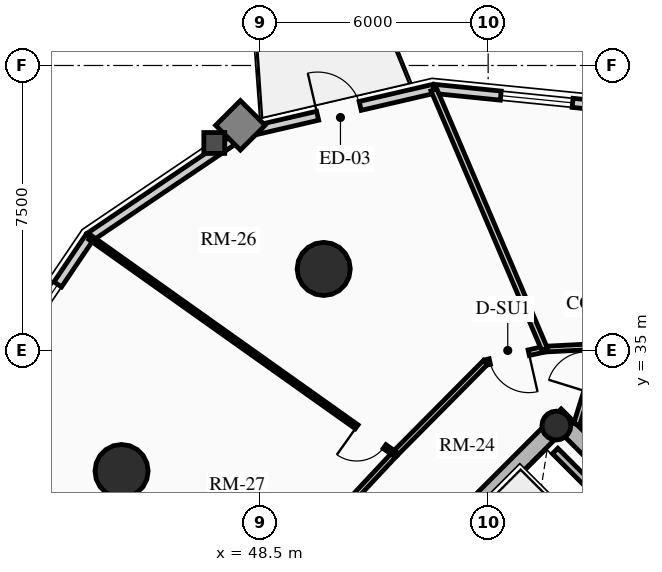
"""IFC4 building model, lengths in metres.
Left out: names, types, materials, properties, quantities, classifications, styles, units other than length and angle.
Written with IfcOpenShell. Run it as: python <this file> out.ifc"""

import sys

from ifc_helpers import new_model, si_unit, direction, frame, frame_2d, origin, origin_2d, place, context, subcontext, project, spatial, rectangle, circle, hollow_circle, extrude, source, transform, mapped, element, fill, save


model = new_model("IFC4")
c1 = context("Model", 3, precision=1e-05, world=origin(), true_north=direction((0.0, 1.0)))
c2 = subcontext(c1, "Body", "Model", "MODEL_VIEW")
j1 = project(units=[si_unit("LENGTHUNIT", "METRE"), si_unit("PLANEANGLEUNIT", "RADIAN")], contexts=[c1])
p1 = place(None, origin())
s1 = spatial("IfcSite", under=j1, at=p1, CompositionType="ELEMENT")
p2 = place(p1, origin())
s2 = spatial("IfcBuilding", under=s1, at=p2, CompositionType="ELEMENT")
p3 = place(p2, frame((0.0, 0.0, 119.62)))
s3 = spatial("IfcBuildingStorey", under=s2, at=p3, CompositionType="ELEMENT", Elevation=119.62)
p4 = place(p3, frame((66.303, 23.263, 0.0), z_axis=(0.0, 0.0, 1.0), x_axis=(-0.707106781187, 0.707106781187, 0.0)))
e1 = element("IfcWall", 1, at=p4, inside=s3, PredefinedType="SHEAR", context=c2, shape_type="SweptSolid", body=[
    extrude(rectangle(XDim=14.2, YDim=0.45, at=frame_2d((7.1, 0.0))), origin(), (0.0, 0.0, 1.0), 2.91),
])
p5 = place(p3, frame((48.856, 25.578, 0.0), z_axis=(0.0, 0.0, 1.0), x_axis=(0.707106781187, 0.707106781187, 0.0)))
e2 = element("IfcWall", 2, at=p5, inside=s3, PredefinedType="SHEAR", context=c2, shape_type="SweptSolid", body=[
    extrude(rectangle(XDim=10.7, YDim=0.45, at=frame_2d((5.35, 0.0))), origin(), (0.0, 0.0, 1.0), 2.91),
])
m1 = source(origin(), c2, "Body", "SweptSolid", [
    extrude(rectangle(XDim=1.5, YDim=2.02, at=frame_2d((0.75, 1.01))), frame((0.0, 0.235, 0.0), z_axis=(0.0, -1.0, 0.0), x_axis=(1.0, 0.0, 0.0)), (0.0, 0.0, 1.0), 0.47),
])
p6 = place(p5, frame((4.6, 0.0, 0.0)))
e3 = element("IfcOpeningElement", 3, at=p6, cuts=e2, PredefinedType="OPENING", context=c2, shape_type="MappedRepresentation", body=[
    mapped(m1, transform((0.0, 0.0, 0.0), x_axis=(1.0, 0.0, 0.0), y_axis=(0.0, 1.0, 0.0), z_axis=(0.0, 0.0, 1.0), scale=1.0)),
])
p7 = place(p3, frame((56.294, 33.024, 0.0), z_axis=(0.0, 0.0, 1.0), x_axis=(0.707106781187, 0.707106781187, 0.0)))
e4 = element("IfcColumn", 4, at=p7, inside=s3, PredefinedType="COLUMN", context=c2, shape_type="SweptSolid", body=[
    extrude(hollow_circle(Radius=0.38, WallThickness=0.032, at=origin_2d()), origin(), (0.0, 0.0, 1.0), 2.91),
])
for number, where, z_axis, x_axis in (
    (5, (50.173, 37.146, 0.0), (0.0, 0.0, 1.0), (1.0, 0.0, 0.0)),
    (6, (44.854, 31.827, 0.0), (0.0, 0.0, 1.0), (1.0, 0.0, 0.0)),
):
    element("IfcColumn", number, at=place(p3, frame(where, z_axis=z_axis, x_axis=x_axis)), inside=s3, PredefinedType="USERDEFINED", context=c2, shape_type="SweptSolid", body=[
        extrude(circle(Radius=0.7, at=origin_2d()), origin(), (0.0, 0.0, 1.0), 2.91),
    ])
p8 = place(p3, frame((53.067, 41.885, 0.0), z_axis=(0.0, 0.0, 1.0), x_axis=(0.994971754311, -0.10015591906, 0.0)))
e7 = element("IfcWall", 7, at=p8, inside=s3, PredefinedType="SOLIDWALL", context=c2, shape_type="SweptSolid", body=[
    extrude(rectangle(XDim=5.448, YDim=0.24, at=frame_2d((2.724, 0.0))), origin(), (0.0, 0.0, 1.0), 2.179),
])
m2 = source(origin(), c2, "Body", "SweptSolid", [
    extrude(rectangle(XDim=1.9, YDim=1.35, at=frame_2d((0.95, 0.675))), frame((0.0, 0.13, 0.0), z_axis=(0.0, -1.0, 0.0), x_axis=(1.0, 0.0, 0.0)), (0.0, 0.0, 1.0), 0.26),
])
p9 = place(p8, frame((1.774, 0.0, 0.65)))
e8 = element("IfcOpeningElement", 8, at=p9, cuts=e7, PredefinedType="OPENING", context=c2, shape_type="MappedRepresentation", body=[
    mapped(m2, transform((0.0, 0.0, 0.0), x_axis=(1.0, 0.0, 0.0), y_axis=(0.0, 1.0, 0.0), z_axis=(0.0, 0.0, 1.0), scale=1.0)),
])
p10 = place(p3, frame((48.08, 40.729, 0.0), z_axis=(0.0, 0.0, 1.0), x_axis=(0.974165631126, 0.225834725257, 0.0)))
e9 = element("IfcWall", 9, at=p10, inside=s3, PredefinedType="SOLIDWALL", context=c2, shape_type="SweptSolid", body=[
    extrude(rectangle(XDim=5.119, YDim=0.24, at=frame_2d((2.56, 0.0))), origin(), (0.0, 0.0, 1.0), 2.179),
])
m3 = source(origin(), c2, "Body", "SweptSolid", [
    extrude(rectangle(XDim=1.15, YDim=2.005, at=frame_2d((0.575, 1.002))), frame((0.0, 0.13, 0.0), z_axis=(0.0, -1.0, 0.0), x_axis=(1.0, 0.0, 0.0)), (0.0, 0.0, 1.0), 0.26),
])
p11 = place(p10, frame((1.984, 0.0, 0.0)))
e10 = element("IfcOpeningElement", 10, at=p11, cuts=e9, PredefinedType="OPENING", context=c2, shape_type="MappedRepresentation", body=[
    mapped(m3, transform((0.0, 0.0, 0.0), x_axis=(1.0, 0.0, 0.0), y_axis=(0.0, 1.0, 0.0), z_axis=(0.0, 0.0, 1.0), scale=1.0)),
])
p12 = place(p3, frame((44.015, 37.985, 0.0), z_axis=(0.0, 0.0, 1.0), x_axis=(0.828781148131, 0.559572880421, 0.0)))
e11 = element("IfcWall", 11, at=p12, inside=s3, PredefinedType="SOLIDWALL", context=c2, shape_type="SweptSolid", body=[
    extrude(rectangle(XDim=4.905, YDim=0.24, at=frame_2d((2.452, 0.0))), origin(), (0.0, 0.0, 1.0), 2.179),
])
p13 = place(p3, frame((41.271, 33.92, 0.0), z_axis=(0.0, 0.0, 1.0), x_axis=(0.559572880421, 0.828781148131, 0.0)))
e12 = element("IfcWall", 12, at=p13, inside=s3, PredefinedType="SOLIDWALL", context=c2, shape_type="SweptSolid", body=[
    extrude(rectangle(XDim=4.905, YDim=0.24, at=frame_2d((2.452, 0.0))), origin(), (0.0, 0.0, 1.0), 2.179),
])
p14 = place(p13, frame((1.502, 0.0, 0.65)))
e13 = element("IfcOpeningElement", 13, at=p14, cuts=e12, PredefinedType="OPENING", context=c2, shape_type="MappedRepresentation", body=[
    mapped(m2, transform((0.0, 0.0, 0.0), x_axis=(1.0, 0.0, 0.0), y_axis=(0.0, 1.0, 0.0), z_axis=(0.0, 0.0, 1.0), scale=1.0)),
])
p15 = place(p3, frame((55.615, 29.227, 0.0), z_axis=(0.0, 0.0, 1.0), x_axis=(0.707147878904, 0.70706568108, 0.0)))
e14 = element("IfcWall", 14, at=p15, inside=s3, PredefinedType="SHEAR", context=c2, shape_type="SweptSolid", body=[
    extrude(rectangle(XDim=2.97, YDim=0.2, at=frame_2d((1.485, 0.0))), origin(), (0.0, 0.0, 1.0), 2.91),
])
p16 = place(p3, frame((57.419, 31.2, 0.0), z_axis=(0.0, 0.0, 1.0), x_axis=(-0.707032117043, 0.707181437447, 0.0)))
e15 = element("IfcWall", 15, at=p16, inside=s3, PredefinedType="SHEAR", context=c2, shape_type="SweptSolid", body=[
    extrude(rectangle(XDim=1.635, YDim=0.2, at=frame_2d((0.817, 0.0))), origin(), (0.0, 0.0, 1.0), 2.91),
])
p17 = place(p3, frame((57.467, 35.111, 0.0), z_axis=(0.0, 0.0, 1.0), x_axis=(-0.998691757323, -0.051134859488, 0.0)))
e16 = element("IfcWall", 16, at=p17, inside=s3, PredefinedType="PARTITIONING", context=c2, shape_type="SweptSolid", body=[
    extrude(rectangle(XDim=1.485, YDim=0.15, at=frame_2d((0.742, 0.0))), origin(), (0.0, 0.0, 1.0), 2.225),
])
p18 = place(p3, frame((55.984, 35.035, 0.0), z_axis=(0.0, 0.0, 1.0), x_axis=(-0.975290305708, -0.22092718165, 0.0)))
e17 = element("IfcWall", 17, at=p18, inside=s3, PredefinedType="PARTITIONING", context=c2, shape_type="SweptSolid", body=[
    extrude(rectangle(XDim=1.597, YDim=0.15, at=frame_2d((0.798, 0.0))), origin(), (0.0, 0.0, 1.0), 2.225),
])
m4 = source(origin(), c2, "Body", "SweptSolid", [
    extrude(rectangle(XDim=1.05, YDim=2.015, at=frame_2d((0.525, 1.007))), frame((0.0, 0.085, 0.0), z_axis=(0.0, -1.0, 0.0), x_axis=(1.0, 0.0, 0.0)), (0.0, 0.0, 1.0), 0.17),
])
p19 = place(p18, frame((0.427, 0.0, 0.0)))
e18 = element("IfcOpeningElement", 18, at=p19, cuts=e17, PredefinedType="OPENING", context=c2, shape_type="MappedRepresentation", body=[
    mapped(m4, transform((0.0, 0.0, 0.0), x_axis=(1.0, 0.0, 0.0), y_axis=(0.0, 1.0, 0.0), z_axis=(0.0, 0.0, 1.0), scale=1.0)),
])
p20 = place(p3, frame((54.427, 34.683, 0.0), z_axis=(0.0, 0.0, 1.0), x_axis=(-0.704178989986, -0.710022499687, 0.0)))
e19 = element("IfcWall", 19, at=p20, inside=s3, PredefinedType="PARTITIONING", context=c2, shape_type="SweptSolid", body=[
    extrude(rectangle(XDim=3.384, YDim=0.15, at=frame_2d((1.692, 0.0))), origin(), (0.0, 0.0, 1.0), 2.225),
])
p21 = place(p3, frame((52.043, 32.28, 0.0), z_axis=(0.0, 0.0, 1.0), x_axis=(-0.682606081633, -0.730786519661, 0.0)))
e20 = element("IfcWall", 20, at=p21, inside=s3, PredefinedType="PARTITIONING", context=c2, shape_type="SweptSolid", body=[
    extrude(rectangle(XDim=6.527, YDim=0.15, at=frame_2d((3.263, 0.0))), origin(), (0.0, 0.0, 1.0), 2.225),
])
p22 = place(p3, frame((55.984, 35.035, 0.0), z_axis=(0.0, 0.0, 1.0), x_axis=(-0.392438685048, 0.919778168081, 0.0)))
e21 = element("IfcWall", 21, at=p22, inside=s3, PredefinedType="PARTITIONING", context=c2, shape_type="SweptSolid", body=[
    extrude(rectangle(XDim=7.426, YDim=0.16, at=frame_2d((3.713, 0.0))), origin(), (0.0, 0.0, 1.0), 2.179),
])
p23 = place(p3, frame((56.828, 33.056, 0.0), z_axis=(0.0, 0.0, 1.0), x_axis=(0.296730996083, 0.954961107042, 0.0)))
e22 = element("IfcWall", 22, at=p23, inside=s3, PredefinedType="PARTITIONING", context=c2, shape_type="SweptSolid", body=[
    extrude(rectangle(XDim=2.152, YDim=0.16, at=frame_2d((1.076, 0.0))), origin(), (0.0, 0.0, 1.0), 2.225),
])
m5 = source(origin(), c2, "Body", "SweptSolid", [
    extrude(rectangle(XDim=1.05, YDim=2.015, at=frame_2d((0.525, 1.007))), frame((0.0, 0.09, 0.0), z_axis=(0.0, -1.0, 0.0), x_axis=(1.0, 0.0, 0.0)), (0.0, 0.0, 1.0), 0.18),
])
p24 = place(p23, frame((0.902, 0.0, 0.0)))
e23 = element("IfcOpeningElement", 23, at=p24, cuts=e22, PredefinedType="OPENING", context=c2, shape_type="MappedRepresentation", body=[
    mapped(m5, transform((0.0, 0.0, 0.0), x_axis=(1.0, 0.0, 0.0), y_axis=(0.0, 1.0, 0.0), z_axis=(0.0, 0.0, 1.0), scale=1.0)),
])
p25 = place(p3, frame((52.043, 32.28, 0.0), z_axis=(0.0, 0.0, 1.0), x_axis=(-0.81534487613, 0.578975589268, 0.0)))
e24 = element("IfcWall", 24, at=p25, inside=s3, PredefinedType="PARTITIONING", context=c2, shape_type="SweptSolid", body=[
    extrude(rectangle(XDim=9.829, YDim=0.125, at=frame_2d((4.915, 0.0))), origin(), (0.0, 0.0, 1.0), 2.179),
])
m6 = source(origin(), c2, "Body", "SweptSolid", [
    extrude(rectangle(XDim=0.9, YDim=2.005, at=frame_2d((0.45, 1.002))), frame((0.0, 0.073, 0.0), z_axis=(0.0, -1.0, 0.0), x_axis=(1.0, 0.0, 0.0)), (0.0, 0.0, 1.0), 0.145),
])
p26 = place(p25, frame((0.33, 0.0, 0.0)))
e25 = element("IfcOpeningElement", 25, at=p26, cuts=e24, PredefinedType="OPENING", context=c2, shape_type="MappedRepresentation", body=[
    mapped(m6, transform((0.0, 0.0, 0.0), x_axis=(1.0, 0.0, 0.0), y_axis=(0.0, 1.0, 0.0), z_axis=(0.0, 0.0, 1.0), scale=1.0)),
])
m7 = source(origin(), c2, "Body", "SweptSolid", [
    extrude(rectangle(XDim=1.9, YDim=1.35, at=frame_2d((0.95, 0.675))), frame((0.0, 0.03, 0.0), z_axis=(0.0, -1.0, 0.0), x_axis=(1.0, 0.0, 0.0)), (0.0, 0.0, 1.0), 0.06),
])
p27 = place(p9, origin())
e26 = element("IfcWindow", 26, at=p27, inside=s3, PartitioningType="DOUBLE_PANEL_VERTICAL", PredefinedType="WINDOW", context=c2, shape_type="MappedRepresentation", body=[
    mapped(m7, transform((0.0, 0.0, 0.0), x_axis=(1.0, 0.0, 0.0), y_axis=(0.0, 1.0, 0.0), z_axis=(0.0, 0.0, 1.0), scale=1.0)),
])
fill(e8, e26)
m8 = source(origin(), c2, "Body", "SweptSolid", [
    extrude(rectangle(XDim=1.15, YDim=2.005, at=frame_2d((0.575, 1.002))), frame((0.0, 0.025, 0.0), z_axis=(0.0, -1.0, 0.0), x_axis=(1.0, 0.0, 0.0)), (0.0, 0.0, 1.0), 0.05),
])
p28 = place(p11, origin())
e27 = element("IfcDoor", 27, at=p28, inside=s3, OperationType="SINGLE_SWING_LEFT", PredefinedType="DOOR", context=c2, shape_type="MappedRepresentation", body=[
    mapped(m8, transform((0.0, 0.0, 0.0), x_axis=(1.0, 0.0, 0.0), y_axis=(0.0, 1.0, 0.0), z_axis=(0.0, 0.0, 1.0), scale=1.0)),
])
fill(e10, e27)
p29 = place(p14, origin())
e28 = element("IfcWindow", 28, at=p29, inside=s3, PartitioningType="DOUBLE_PANEL_VERTICAL", PredefinedType="WINDOW", context=c2, shape_type="MappedRepresentation", body=[
    mapped(m7, transform((0.0, 0.0, 0.0), x_axis=(1.0, 0.0, 0.0), y_axis=(0.0, 1.0, 0.0), z_axis=(0.0, 0.0, 1.0), scale=1.0)),
])
fill(e13, e28)
m9 = source(origin(), c2, "Body", "SweptSolid", [
    extrude(rectangle(XDim=1.05, YDim=2.015, at=frame_2d((0.525, 1.007))), frame((0.0, 0.025, 0.0), z_axis=(0.0, -1.0, 0.0), x_axis=(1.0, 0.0, 0.0)), (0.0, 0.0, 1.0), 0.05),
])
p30 = place(p19, origin())
e29 = element("IfcDoor", 29, at=p30, inside=s3, OperationType="SINGLE_SWING_LEFT", PredefinedType="DOOR", context=c2, shape_type="MappedRepresentation", body=[
    mapped(m9, transform((0.0, 0.0, 0.0), x_axis=(1.0, 0.0, 0.0), y_axis=(0.0, 1.0, 0.0), z_axis=(0.0, 0.0, 1.0), scale=1.0)),
])
fill(e18, e29)
m10 = source(origin(), c2, "Body", "SweptSolid", [
    extrude(rectangle(XDim=0.9, YDim=2.005, at=frame_2d((0.45, 1.002))), frame((0.0, 0.025, 0.0), z_axis=(0.0, -1.0, 0.0), x_axis=(1.0, 0.0, 0.0)), (0.0, 0.0, 1.0), 0.05),
])
p31 = place(p26, origin())
e30 = element("IfcDoor", 30, at=p31, inside=s3, OperationType="SINGLE_SWING_RIGHT", PredefinedType="DOOR", context=c2, shape_type="MappedRepresentation", body=[
    mapped(m10, transform((0.0, 0.0, 0.0), x_axis=(1.0, 0.0, 0.0), y_axis=(0.0, 1.0, 0.0), z_axis=(0.0, 0.0, 1.0), scale=1.0)),
])
fill(e25, e30)
save(model, sys.argv[1])
